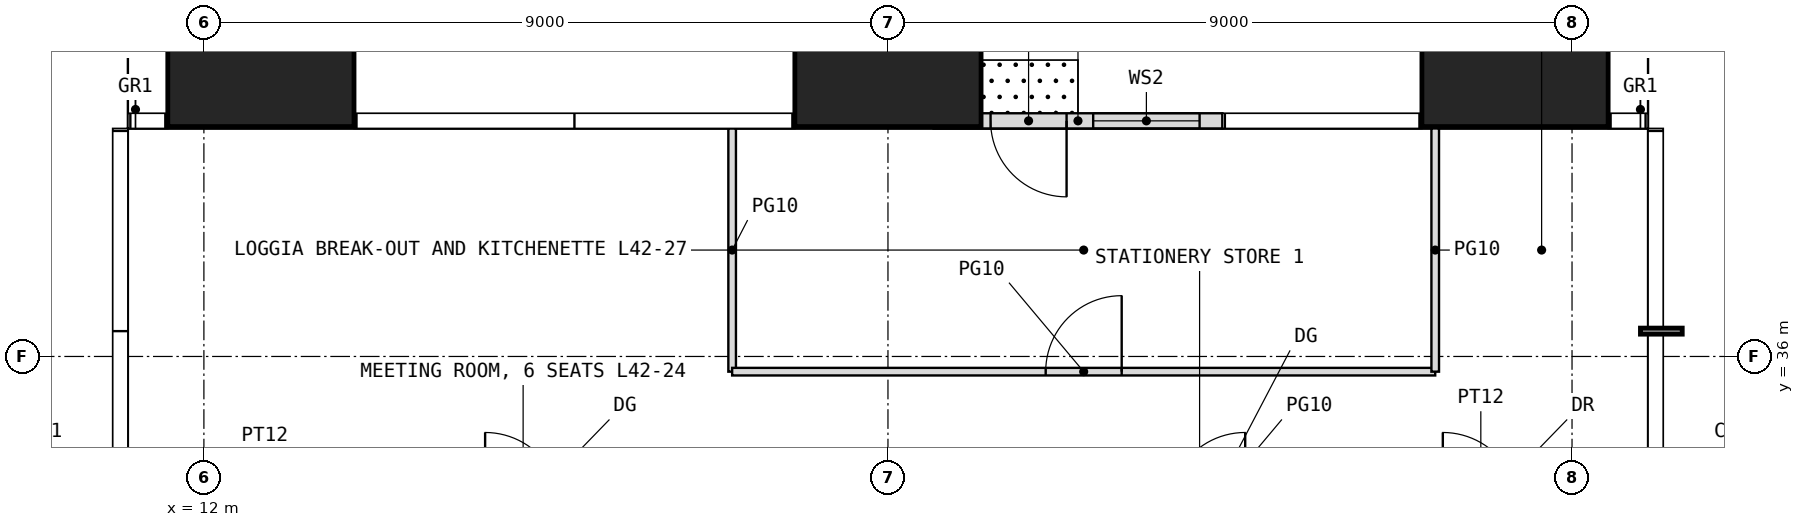
"""IFC4 building model, lengths in metres.
Left out: names, types, materials, properties, quantities, classifications, styles, units other than length and angle.
Written with IfcOpenShell. Run it as: python <this file> out.ifc"""

import sys

from ifc_helpers import new_model, si_unit, direction, frame, frame_2d, origin, origin_2d, place, context, subcontext, project, spatial, rectangle, extrude, element, fill, save


model = new_model("IFC4")
c1 = context("Model", 3, precision=1e-05, world=origin(), true_north=direction((0.0, 1.0)))
c2 = subcontext(c1, "Body", "Model", "MODEL_VIEW")
j1 = project(units=[si_unit("LENGTHUNIT", "METRE"), si_unit("PLANEANGLEUNIT", "RADIAN")], contexts=[c1])
p1 = place(None, origin())
s1 = spatial("IfcSite", under=j1, at=p1, CompositionType="ELEMENT")
p2 = place(p1, origin())
s2 = spatial("IfcBuilding", under=s1, at=p2, CompositionType="ELEMENT")
p3 = place(p2, frame((0.0, 0.0, 178.5)))
s3 = spatial("IfcBuildingStorey", under=s2, at=p3, CompositionType="ELEMENT", Elevation=178.5)
for number, where, z_axis, x_axis in (
    (1, (12.75, 40.25, 0.0), (0.0, 0.0, 1.0), (1.0, 0.0, 0.0)),
    (2, (21.0, 40.25, 0.0), (0.0, 0.0, 1.0), (1.0, 0.0, 0.0)),
    (3, (29.25, 40.25, 0.0), (0.0, 0.0, 1.0), (1.0, 0.0, 0.0)),
):
    element("IfcColumn", number, at=place(p3, frame(where, z_axis=z_axis, x_axis=x_axis)), inside=s3, PredefinedType="COLUMN", context=c2, shape_type="SweptSolid", body=[
        extrude(rectangle(XDim=2.45, YDim=2.45, at=origin_2d()), origin(), (0.0, 0.0, 1.0), 4.0),
    ])
p4 = place(p3, frame((25.4, 39.1, 0.0), z_axis=(0.0, 0.0, 1.0), x_axis=(-1.0, 0.0, 0.0)))
e4 = element("IfcWall", 4, at=p4, inside=s3, PredefinedType="USERDEFINED", context=c2, shape_type="SweptSolid", body=[
    extrude(rectangle(XDim=3.8, YDim=0.2, at=frame_2d((1.9, 0.0))), origin(), (0.0, 0.0, 1.0), 3.75),
])
p5 = place(p4, frame((2.05, 0.0, 0.0)))
e5 = element("IfcOpeningElement", 5, at=p5, cuts=e4, PredefinedType="OPENING", context=c2, shape_type="SweptSolid", body=[
    extrude(rectangle(XDim=1.0, YDim=2.4, at=frame_2d((0.5, 1.2))), frame((0.0, 0.11, 0.0), z_axis=(0.0, -1.0, 0.0), x_axis=(1.0, 0.0, 0.0)), (0.0, 0.0, 1.0), 0.22),
])
p6 = place(p4, frame((0.3, 0.0, 0.3)))
e6 = element("IfcOpeningElement", 6, at=p6, cuts=e4, PredefinedType="OPENING", context=c2, shape_type="SweptSolid", body=[
    extrude(rectangle(XDim=1.4, YDim=2.7, at=frame_2d((0.7, 1.35))), frame((0.0, 0.11, 0.0), z_axis=(0.0, -1.0, 0.0), x_axis=(1.0, 0.0, 0.0)), (0.0, 0.0, 1.0), 0.22),
])
p7 = place(p3, frame((18.95, 35.8, 0.0), z_axis=(0.0, 0.0, 1.0), x_axis=(0.0, 1.0, 0.0)))
e7 = element("IfcWall", 7, at=p7, inside=s3, PredefinedType="PARTITIONING", context=c2, shape_type="SweptSolid", body=[
    extrude(rectangle(XDim=3.2, YDim=0.1, at=frame_2d((1.6, 0.0))), origin(), (0.0, 0.0, 1.0), 3.75),
])
p8 = place(p3, frame((18.95, 35.8, 0.0), z_axis=(0.0, 0.0, 1.0), x_axis=(1.0, 0.0, 0.0)))
e8 = element("IfcWall", 8, at=p8, inside=s3, PredefinedType="PARTITIONING", context=c2, shape_type="SweptSolid", body=[
    extrude(rectangle(XDim=9.25, YDim=0.1, at=frame_2d((4.625, 0.0))), origin(), (0.0, 0.0, 1.0), 3.75),
])
p9 = place(p8, frame((4.125, 0.0, 0.0)))
e9 = element("IfcOpeningElement", 9, at=p9, cuts=e8, PredefinedType="OPENING", context=c2, shape_type="SweptSolid", body=[
    extrude(rectangle(XDim=1.0, YDim=2.4, at=frame_2d((0.5, 1.2))), frame((0.0, 0.06, 0.0), z_axis=(0.0, -1.0, 0.0), x_axis=(1.0, 0.0, 0.0)), (0.0, 0.0, 1.0), 0.12),
])
p10 = place(p3, frame((28.2, 35.8, 0.0), z_axis=(0.0, 0.0, 1.0), x_axis=(0.0, 1.0, 0.0)))
e10 = element("IfcWall", 10, at=p10, inside=s3, PredefinedType="PARTITIONING", context=c2, shape_type="SweptSolid", body=[
    extrude(rectangle(XDim=3.2, YDim=0.1, at=frame_2d((1.6, 0.0))), origin(), (0.0, 0.0, 1.0), 3.75),
])
p11 = place(p5, origin())
e11 = element("IfcDoor", 11, at=p11, inside=s3, OperationType="SINGLE_SWING_LEFT", PredefinedType="DOOR", context=c2, shape_type="SweptSolid", body=[
    extrude(rectangle(XDim=1.0, YDim=2.4, at=frame_2d((0.5, 1.2))), frame((0.0, 0.025, 0.0), z_axis=(0.0, -1.0, 0.0), x_axis=(1.0, 0.0, 0.0)), (0.0, 0.0, 1.0), 0.05),
])
fill(e5, e11)
p12 = place(p6, origin())
e12 = element("IfcWindow", 12, at=p12, inside=s3, PartitioningType="SINGLE_PANEL", PredefinedType="WINDOW", context=c2, shape_type="SweptSolid", body=[
    extrude(rectangle(XDim=1.4, YDim=2.7, at=frame_2d((0.7, 1.35))), frame((0.0, 0.03, 0.0), z_axis=(0.0, -1.0, 0.0), x_axis=(1.0, 0.0, 0.0)), (0.0, 0.0, 1.0), 0.06),
])
fill(e6, e12)
p13 = place(p9, origin())
e13 = element("IfcDoor", 13, at=p13, inside=s3, OperationType="SINGLE_SWING_RIGHT", PredefinedType="DOOR", context=c2, shape_type="SweptSolid", body=[
    extrude(rectangle(XDim=1.0, YDim=2.4, at=frame_2d((0.5, 1.2))), frame((0.0, 0.025, 0.0), z_axis=(0.0, -1.0, 0.0), x_axis=(1.0, 0.0, 0.0)), (0.0, 0.0, 1.0), 0.05),
])
fill(e9, e13)
save(model, sys.argv[1])
